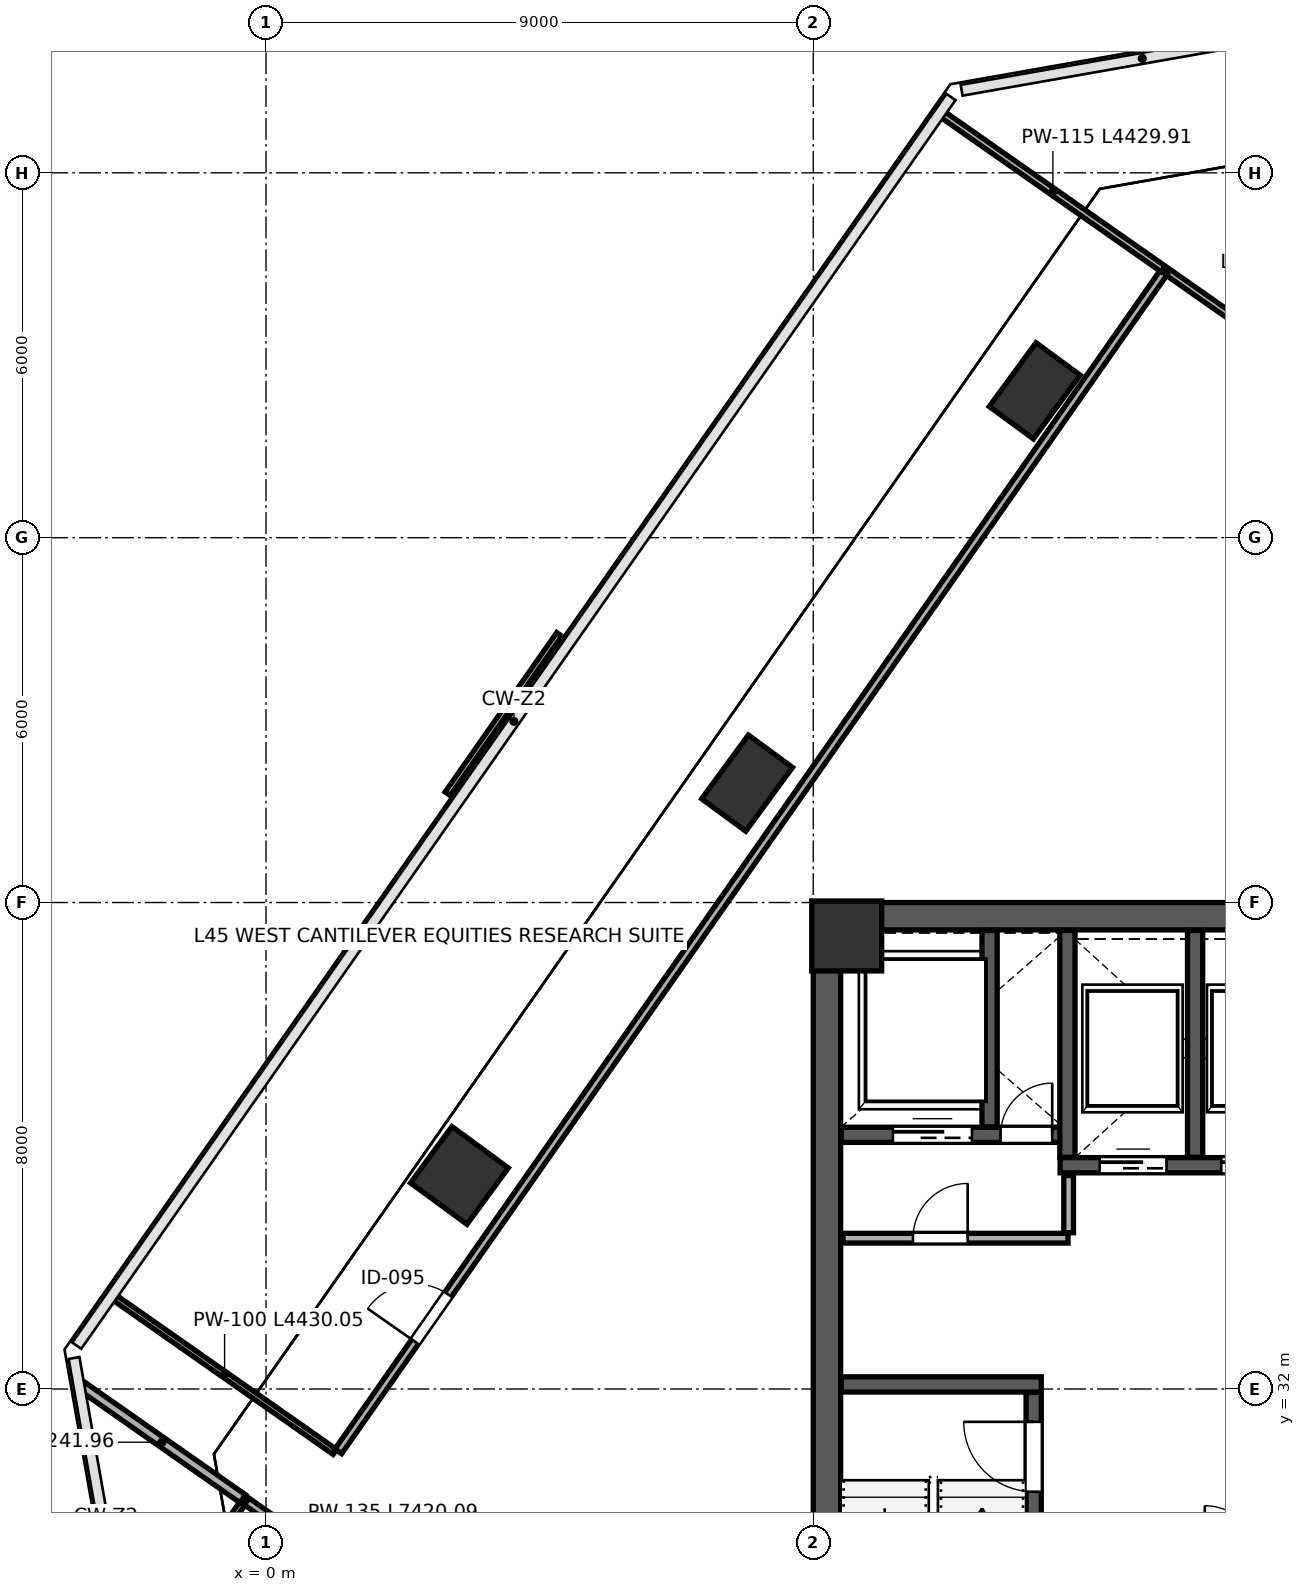
"""IFC4 building model, lengths in metres.
Left out: names, types, materials, properties, quantities, classifications, styles, units other than length and angle.
Written with IfcOpenShell. Run it as: python <this file> out.ifc"""

import sys

from ifc_helpers import new_model, si_unit, direction, frame, frame_2d, origin, origin_2d, place, context, subcontext, project, spatial, rectangle, extrude, clip, halfspace, source, transform, mapped, element, fill, save


model = new_model("IFC4")
c1 = context("Model", 3, precision=1e-05, world=origin(), true_north=direction((0.0, 1.0)))
c2 = subcontext(c1, "Body", "Model", "MODEL_VIEW")
j1 = project(units=[si_unit("LENGTHUNIT", "METRE"), si_unit("PLANEANGLEUNIT", "RADIAN")], contexts=[c1])
p1 = place(None, origin())
s1 = spatial("IfcSite", under=j1, at=p1, CompositionType="ELEMENT")
p2 = place(p1, origin())
s2 = spatial("IfcBuilding", under=s1, at=p2, CompositionType="ELEMENT")
p3 = place(p2, frame((0.0, 0.0, 200.2)))
s3 = spatial("IfcBuildingStorey", under=s2, at=p3, CompositionType="ELEMENT", Elevation=200.2)
m1 = source(origin(), c2, "Body", "SweptSolid", [
    extrude(rectangle(XDim=1.15, YDim=1.15, at=origin_2d()), origin(), (0.0, 0.0, 1.0), 4.198),
])
p4 = place(p3, frame((9.55, 39.45, 0.001), z_axis=(0.0, 0.0, 1.0), x_axis=(1.0, 0.0, 0.0)))
e1 = element("IfcColumn", 1, at=p4, inside=s3, PredefinedType="COLUMN", context=c2, shape_type="MappedRepresentation", body=[
    mapped(m1, transform((0.0, 0.0, 0.0), scale=1.0)),
])
p5 = place(p3, frame((3.181, 35.512, 0.0), z_axis=(0.01920894309, 0.094540400629, 0.995335686668), x_axis=(0.673107823398, -0.737340991453, 0.057044898138)))
e2 = element("IfcColumn", 2, at=p5, inside=s3, PredefinedType="COLUMN", context=c2, shape_type="Clipping", body=[
    clip(clip(extrude(rectangle(XDim=1.15, YDim=1.15, at=origin_2d()), origin(), (0.0, 0.0, 1.0), 4.22), halfspace(frame((0.0, 0.0, 0.079), z_axis=(0.0, 0.0, -1.0), x_axis=(1.0, 0.0, 0.0)), False)), halfspace(frame((0.0, 0.0, 4.141), z_axis=(0.0, 0.0, 1.0), x_axis=(1.0, 0.0, 0.0)), False)),
])
p6 = place(p3, frame((7.911, 41.964, 0.0), z_axis=(0.052348868529, 0.069721280651, 0.996192019135), x_axis=(0.291213371779, -0.955267995537, 0.051554134659)))
e3 = element("IfcColumn", 3, at=p6, inside=s3, PredefinedType="PILASTER", context=c2, shape_type="Clipping", body=[
    clip(clip(extrude(rectangle(XDim=0.9, YDim=1.3, at=origin_2d()), origin(), (0.0, 0.0, 1.0), 4.216), halfspace(frame((0.0, 0.0, 0.07), z_axis=(0.0, 0.0, -1.0), x_axis=(1.0, 0.0, 0.0)), False)), halfspace(frame((0.0, 0.0, 4.146), z_axis=(0.0, 0.0, 1.0), x_axis=(1.0, 0.0, 0.0)), False)),
])
p7 = place(p3, frame((12.642, 48.415, 0.0), z_axis=(0.085398713421, 0.044897968574, 0.995334733727), x_axis=(-0.145662224799, -0.987688074539, 0.057050711483)))
e4 = element("IfcColumn", 4, at=p7, inside=s3, PredefinedType="PILASTER", context=c2, shape_type="Clipping", body=[
    clip(clip(extrude(rectangle(XDim=0.9, YDim=1.3, at=origin_2d()), origin(), (0.0, 0.0, 1.0), 4.22), halfspace(frame((0.0, 0.0, 0.077), z_axis=(0.0, 0.0, -1.0), x_axis=(1.0, 0.0, 0.0)), False)), halfspace(frame((0.0, 0.0, 4.142), z_axis=(0.0, 0.0, 1.0), x_axis=(1.0, 0.0, 0.0)), False)),
])
p8 = place(p3, frame((9.225, 24.45, 0.0), z_axis=(0.0, 0.0, 1.0), x_axis=(0.0, 1.0, 0.0)))
e5 = element("IfcWall", 5, at=p8, inside=s3, PredefinedType="SHEAR", context=c2, shape_type="SweptSolid", body=[
    extrude(rectangle(XDim=15.1, YDim=0.45, at=frame_2d((7.55, 0.0))), origin(), (0.0, 0.0, 1.0), 3.96),
])
p9 = place(p3, frame((9.0, 39.775, 0.0), z_axis=(0.0, 0.0, 1.0), x_axis=(1.0, 0.0, 0.0)))
e6 = element("IfcWall", 6, at=p9, inside=s3, PredefinedType="SHEAR", context=c2, shape_type="SweptSolid", body=[
    extrude(rectangle(XDim=18.0, YDim=0.45, at=frame_2d((9.0, 0.0))), origin(), (0.0, 0.0, 1.0), 3.96),
])
p10 = place(p3, frame((12.625, 24.46, 0.0), z_axis=(0.0, 0.0, 1.0), x_axis=(0.0, 1.0, 0.0)))
e7 = element("IfcWall", 7, at=p10, inside=s3, PredefinedType="SHEAR", context=c2, shape_type="SweptSolid", body=[
    extrude(rectangle(XDim=7.49, YDim=0.25, at=frame_2d((3.745, 0.0))), origin(), (0.0, 0.0, 1.0), 3.96),
])
p11 = place(p10, frame((5.85, 0.0, 0.0)))
e8 = element("IfcOpeningElement", 8, at=p11, cuts=e7, PredefinedType="OPENING", context=c2, shape_type="SweptSolid", body=[
    extrude(rectangle(XDim=1.15, YDim=2.2, at=frame_2d((0.575, 1.1))), frame((0.0, 0.135, 0.0), z_axis=(0.0, -1.0, 0.0), x_axis=(1.0, 0.0, 0.0)), (0.0, 0.0, 1.0), 0.27),
])
p12 = place(p3, frame((9.46, 32.075, 0.0), z_axis=(0.0, 0.0, 1.0), x_axis=(1.0, 0.0, 0.0)))
e9 = element("IfcWall", 9, at=p12, inside=s3, PredefinedType="SHEAR", context=c2, shape_type="SweptSolid", body=[
    extrude(rectangle(XDim=3.29, YDim=0.25, at=frame_2d((1.645, 0.0))), origin(), (0.0, 0.0, 1.0), 3.96),
])
p13 = place(p3, frame((9.46, 36.18, 0.0), z_axis=(0.0, 0.0, 1.0), x_axis=(1.0, 0.0, 0.0)))
e10 = element("IfcWall", 10, at=p13, inside=s3, PredefinedType="SHEAR", context=c2, shape_type="SweptSolid", body=[
    extrude(rectangle(XDim=3.79, YDim=0.25, at=frame_2d((1.895, 0.0))), origin(), (0.0, 0.0, 1.0), 3.96),
])
p14 = place(p13, frame((2.62, 0.0, 0.0)))
e11 = element("IfcOpeningElement", 11, at=p14, cuts=e10, PredefinedType="OPENING", context=c2, shape_type="SweptSolid", body=[
    extrude(rectangle(XDim=0.85, YDim=2.1, at=frame_2d((0.425, 1.05))), frame((0.0, 0.135, 0.0), z_axis=(0.0, -1.0, 0.0), x_axis=(1.0, 0.0, 0.0)), (0.0, 0.0, 1.0), 0.27),
])
p15 = place(p13, frame((0.85, 0.0, 0.0)))
e12 = element("IfcOpeningElement", 12, at=p15, cuts=e10, PredefinedType="OPENING", context=c2, shape_type="SweptSolid", body=[
    extrude(rectangle(XDim=1.3, YDim=2.25, at=frame_2d((0.65, 1.125))), frame((0.0, 0.135, 0.0), z_axis=(0.0, -1.0, 0.0), x_axis=(1.0, 0.0, 0.0)), (0.0, 0.0, 1.0), 0.27),
])
p16 = place(p3, frame((11.9, 36.31, 0.0), z_axis=(0.0, 0.0, 1.0), x_axis=(0.0, 1.0, 0.0)))
e13 = element("IfcWall", 13, at=p16, inside=s3, PredefinedType="SHEAR", context=c2, shape_type="SweptSolid", body=[
    extrude(rectangle(XDim=3.23, YDim=0.25, at=frame_2d((1.615, 0.0))), origin(), (0.0, 0.0, 1.0), 3.96),
])
p17 = place(p3, frame((13.06, 35.68, 0.0), z_axis=(0.0, 0.0, 1.0), x_axis=(1.0, 0.0, 0.0)))
e14 = element("IfcWall", 14, at=p17, inside=s3, PredefinedType="SHEAR", context=c2, shape_type="SweptSolid", body=[
    extrude(rectangle(XDim=4.25, YDim=0.25, at=frame_2d((2.125, 0.0))), origin(), (0.0, 0.0, 1.0), 3.96),
])
p18 = place(p17, frame((0.65, 0.0, 0.0)))
e15 = element("IfcOpeningElement", 15, at=p18, cuts=e14, PredefinedType="OPENING", context=c2, shape_type="SweptSolid", body=[
    extrude(rectangle(XDim=1.1, YDim=2.2, at=frame_2d((0.55, 1.1))), frame((0.0, 0.135, 0.0), z_axis=(0.0, -1.0, 0.0), x_axis=(1.0, 0.0, 0.0)), (0.0, 0.0, 1.0), 0.27),
])
p19 = place(p17, frame((2.65, 0.0, 0.0)))
e16 = element("IfcOpeningElement", 16, at=p19, cuts=e14, PredefinedType="OPENING", context=c2, shape_type="SweptSolid", body=[
    extrude(rectangle(XDim=1.1, YDim=2.2, at=frame_2d((0.55, 1.1))), frame((0.0, 0.135, 0.0), z_axis=(0.0, -1.0, 0.0), x_axis=(1.0, 0.0, 0.0)), (0.0, 0.0, 1.0), 0.27),
])
for number, where, z_axis, x_axis in (
    (17, (13.18, 35.81, 0.0), (0.0, 0.0, 1.0), (0.0, 1.0, 0.0)),
    (18, (15.28, 35.81, 0.0), (0.0, 0.0, 1.0), (0.0, 1.0, 0.0)),
):
    element("IfcWall", number, at=place(p3, frame(where, z_axis=z_axis, x_axis=x_axis)), inside=s3, PredefinedType="SHEAR", context=c2, shape_type="SweptSolid", body=[
        extrude(rectangle(XDim=3.73, YDim=0.25, at=frame_2d((1.865, 0.0))), origin(), (0.0, 0.0, 1.0), 3.96),
    ])
p20 = place(p3, frame((9.49, 34.48, 0.0), z_axis=(0.0, 0.0, 1.0), x_axis=(1.0, 0.0, 0.0)))
e19 = element("IfcWall", 19, at=p20, inside=s3, PredefinedType="PARTITIONING", context=c2, shape_type="SweptSolid", body=[
    extrude(rectangle(XDim=3.7, YDim=0.16, at=frame_2d((1.85, 0.0))), origin(), (0.0, 0.0, 1.0), 3.96),
])
p21 = place(p20, frame((1.15, 0.0, 0.0)))
e20 = element("IfcOpeningElement", 20, at=p21, cuts=e19, PredefinedType="OPENING", context=c2, shape_type="SweptSolid", body=[
    extrude(rectangle(XDim=0.9, YDim=2.15, at=frame_2d((0.45, 1.075))), frame((0.0, 0.09, 0.0), z_axis=(0.0, -1.0, 0.0), x_axis=(1.0, 0.0, 0.0)), (0.0, 0.0, 1.0), 0.18),
])
p22 = place(p3, frame((13.2, 34.57, 0.0), z_axis=(0.0, 0.0, 1.0), x_axis=(0.0, 1.0, 0.0)))
e21 = element("IfcWall", 21, at=p22, inside=s3, PredefinedType="PARTITIONING", context=c2, shape_type="SweptSolid", body=[
    extrude(rectangle(XDim=0.94, YDim=0.16, at=frame_2d((0.47, 0.0))), origin(), (0.0, 0.0, 1.0), 3.96),
])
p23 = place(p3, frame((-2.232, 27.484, 0.0), z_axis=(0.0, 0.0, 1.0), x_axis=(0.573583631645, 0.819147006043, 0.0)))
e22 = element("IfcWall", 22, at=p23, inside=s3, PredefinedType="PARTITIONING", context=c2, shape_type="SweptSolid", body=[
    extrude(rectangle(XDim=3.242, YDim=0.1, at=frame_2d((1.621, 0.0))), origin(), (0.0, 0.0, 1.0), 3.96),
])
p24 = place(p3, frame((-3.038, 32.055, 0.0), z_axis=(0.0, 0.0, 1.0), x_axis=(0.819122229171, -0.573619014397, 0.0)))
e23 = element("IfcWall", 23, at=p24, inside=s3, PredefinedType="PARTITIONING", context=c2, shape_type="SweptSolid", body=[
    extrude(rectangle(XDim=3.242, YDim=0.16, at=frame_2d((1.621, 0.0))), origin(), (0.0, 0.0, 1.0), 3.96),
])
p25 = place(p3, frame((-0.317, 30.149, 0.0), z_axis=(0.0, 0.0, 1.0), x_axis=(0.819142256539, -0.573590414454, 0.0)))
e24 = element("IfcWall", 24, at=p25, inside=s3, PredefinedType="PARTITIONING", context=c2, shape_type="SweptSolid", body=[
    extrude(rectangle(XDim=7.42, YDim=0.135, at=frame_2d((3.71, 0.0))), origin(), (0.0, 0.0, 1.0), 3.96),
])
p26 = place(p25, frame((2.9, 0.0, 0.0)))
e25 = element("IfcOpeningElement", 25, at=p26, cuts=e24, PredefinedType="OPENING", context=c2, shape_type="SweptSolid", body=[
    extrude(rectangle(XDim=0.9, YDim=2.15, at=frame_2d((0.45, 1.075))), frame((0.0, 0.078, 0.0), z_axis=(0.0, -1.0, 0.0), x_axis=(1.0, 0.0, 0.0)), (0.0, 0.0, 1.0), 0.155),
])
p27 = place(p25, frame((5.0, 0.0, 0.0)))
e26 = element("IfcOpeningElement", 26, at=p27, cuts=e24, PredefinedType="OPENING", context=c2, shape_type="SweptSolid", body=[
    extrude(rectangle(XDim=0.95, YDim=2.15, at=frame_2d((0.475, 1.075))), frame((0.0, 0.078, 0.0), z_axis=(0.0, -1.0, 0.0), x_axis=(1.0, 0.0, 0.0)), (0.0, 0.0, 1.0), 0.155),
])
p28 = place(p3, frame((14.821, 50.374, 0.0), z_axis=(0.0, 0.0, 1.0), x_axis=(0.819153719849, -0.573574043396, 0.0)))
e27 = element("IfcWall", 27, at=p28, inside=s3, PredefinedType="PARTITIONING", context=c2, shape_type="SweptSolid", body=[
    extrude(rectangle(XDim=26.99, YDim=0.115, at=frame_2d((13.495, 0.0))), origin(), (0.0, 0.0, 1.0), 3.96),
])
p29 = place(p28, frame((18.8, 0.0, 0.0)))
e28 = element("IfcOpeningElement", 28, at=p29, cuts=e27, PredefinedType="OPENING", context=c2, shape_type="SweptSolid", body=[
    extrude(rectangle(XDim=0.95, YDim=2.15, at=frame_2d((0.475, 1.075))), frame((0.0, 0.067, 0.0), z_axis=(0.0, -1.0, 0.0), x_axis=(1.0, 0.0, 0.0)), (0.0, 0.0, 1.0), 0.135),
])
p30 = place(p3, frame((-2.496, 33.506, 0.0), z_axis=(0.0, 0.0, 1.0), x_axis=(0.819130930641, -0.573606588584, 0.0)))
e29 = element("IfcWall", 29, at=p30, inside=s3, PredefinedType="PARTITIONING", context=c2, shape_type="SweptSolid", body=[
    extrude(rectangle(XDim=4.43, YDim=0.1, at=frame_2d((2.215, 0.0))), origin(), (0.0, 0.0, 1.0), 3.96),
])
p31 = place(p3, frame((1.189, 30.975, 0.0), z_axis=(0.0, 0.0, 1.0), x_axis=(0.573571020786, 0.819155836282, 0.0)))
e30 = element("IfcWall", 30, at=p31, inside=s3, PredefinedType="PARTITIONING", context=c2, shape_type="SweptSolid", body=[
    extrude(rectangle(XDim=23.67, YDim=0.135, at=frame_2d((11.835, 0.0))), origin(), (0.0, 0.0, 1.0), 3.96),
])
p32 = place(p31, frame((2.2, 0.0, 0.0)))
e31 = element("IfcOpeningElement", 31, at=p32, cuts=e30, PredefinedType="OPENING", context=c2, shape_type="SweptSolid", body=[
    extrude(rectangle(XDim=0.95, YDim=2.15, at=frame_2d((0.475, 1.075))), frame((0.0, 0.078, 0.0), z_axis=(0.0, -1.0, 0.0), x_axis=(1.0, 0.0, 0.0)), (0.0, 0.0, 1.0), 0.155),
])
p33 = place(p3, frame((11.127, 52.961, 0.0), z_axis=(0.0, 0.0, 1.0), x_axis=(0.819130930641, -0.573606588584, 0.0)))
e32 = element("IfcWall", 32, at=p33, inside=s3, PredefinedType="PARTITIONING", context=c2, shape_type="SweptSolid", body=[
    extrude(rectangle(XDim=4.43, YDim=0.115, at=frame_2d((2.215, 0.0))), origin(), (0.0, 0.0, 1.0), 3.96),
])
m2 = source(origin(), c2, "Body", "SweptSolid", [
    extrude(rectangle(XDim=1.15, YDim=2.2, at=frame_2d((0.575, 1.1))), frame((0.0, 0.025, 0.0), z_axis=(0.0, -1.0, 0.0), x_axis=(1.0, 0.0, 0.0)), (0.0, 0.0, 1.0), 0.05),
])
p34 = place(p11, origin())
e33 = element("IfcDoor", 33, at=p34, inside=s3, OperationType="SINGLE_SWING_RIGHT", PredefinedType="DOOR", context=c2, shape_type="MappedRepresentation", body=[
    mapped(m2, transform((0.0, 0.0, 0.0), scale=1.0)),
])
fill(e8, e33)
m3 = source(origin(), c2, "Body", "SweptSolid", [
    extrude(rectangle(XDim=0.85, YDim=2.1, at=frame_2d((0.425, 1.05))), frame((0.0, 0.025, 0.0), z_axis=(0.0, -1.0, 0.0), x_axis=(1.0, 0.0, 0.0)), (0.0, 0.0, 1.0), 0.05),
])
p35 = place(p14, origin())
e34 = element("IfcDoor", 34, at=p35, inside=s3, OperationType="SINGLE_SWING_RIGHT", PredefinedType="DOOR", context=c2, shape_type="MappedRepresentation", body=[
    mapped(m3, transform((0.0, 0.0, 0.0), scale=1.0)),
])
fill(e11, e34)
m4 = source(origin(), c2, "Body", "SweptSolid", [
    extrude(rectangle(XDim=1.1, YDim=2.2, at=frame_2d((0.55, 1.1))), frame((0.0, 0.025, 0.0), z_axis=(0.0, -1.0, 0.0), x_axis=(1.0, 0.0, 0.0)), (0.0, 0.0, 1.0), 0.05),
])
p36 = place(p18, origin())
e35 = element("IfcDoor", 35, at=p36, inside=s3, OperationType="SLIDING_TO_LEFT", PredefinedType="DOOR", context=c2, shape_type="MappedRepresentation", body=[
    mapped(m4, transform((0.0, 0.0, 0.0), scale=1.0)),
])
fill(e15, e35)
p37 = place(p19, origin())
e36 = element("IfcDoor", 36, at=p37, inside=s3, OperationType="SLIDING_TO_RIGHT", PredefinedType="DOOR", context=c2, shape_type="MappedRepresentation", body=[
    mapped(m4, transform((0.0, 0.0, 0.0), scale=1.0)),
])
fill(e16, e36)
m5 = source(origin(), c2, "Body", "SweptSolid", [
    extrude(rectangle(XDim=1.3, YDim=2.25, at=frame_2d((0.65, 1.125))), frame((0.0, 0.025, 0.0), z_axis=(0.0, -1.0, 0.0), x_axis=(1.0, 0.0, 0.0)), (0.0, 0.0, 1.0), 0.05),
])
p38 = place(p15, origin())
e37 = element("IfcDoor", 37, at=p38, inside=s3, OperationType="SLIDING_TO_LEFT", PredefinedType="DOOR", context=c2, shape_type="MappedRepresentation", body=[
    mapped(m5, transform((0.0, 0.0, 0.0), scale=1.0)),
])
fill(e12, e37)
m6 = source(origin(), c2, "Body", "SweptSolid", [
    extrude(rectangle(XDim=0.9, YDim=2.15, at=frame_2d((0.45, 1.075))), frame((0.0, 0.025, 0.0), z_axis=(0.0, -1.0, 0.0), x_axis=(1.0, 0.0, 0.0)), (0.0, 0.0, 1.0), 0.05),
])
p39 = place(p21, origin())
e38 = element("IfcDoor", 38, at=p39, inside=s3, OperationType="SINGLE_SWING_RIGHT", PredefinedType="DOOR", context=c2, shape_type="MappedRepresentation", body=[
    mapped(m6, transform((0.0, 0.0, 0.0), scale=1.0)),
])
fill(e20, e38)
m7 = source(origin(), c2, "Body", "SweptSolid", [
    extrude(rectangle(XDim=0.95, YDim=2.15, at=frame_2d((0.475, 1.075))), frame((0.0, 0.025, 0.0), z_axis=(0.0, -1.0, 0.0), x_axis=(1.0, 0.0, 0.0)), (0.0, 0.0, 1.0), 0.05),
])
p40 = place(p32, origin())
e39 = element("IfcDoor", 39, at=p40, inside=s3, OperationType="SINGLE_SWING_LEFT", PredefinedType="DOOR", context=c2, shape_type="MappedRepresentation", body=[
    mapped(m7, transform((0.0, 0.0, 0.0), scale=1.0)),
])
fill(e31, e39)
save(model, sys.argv[1])
